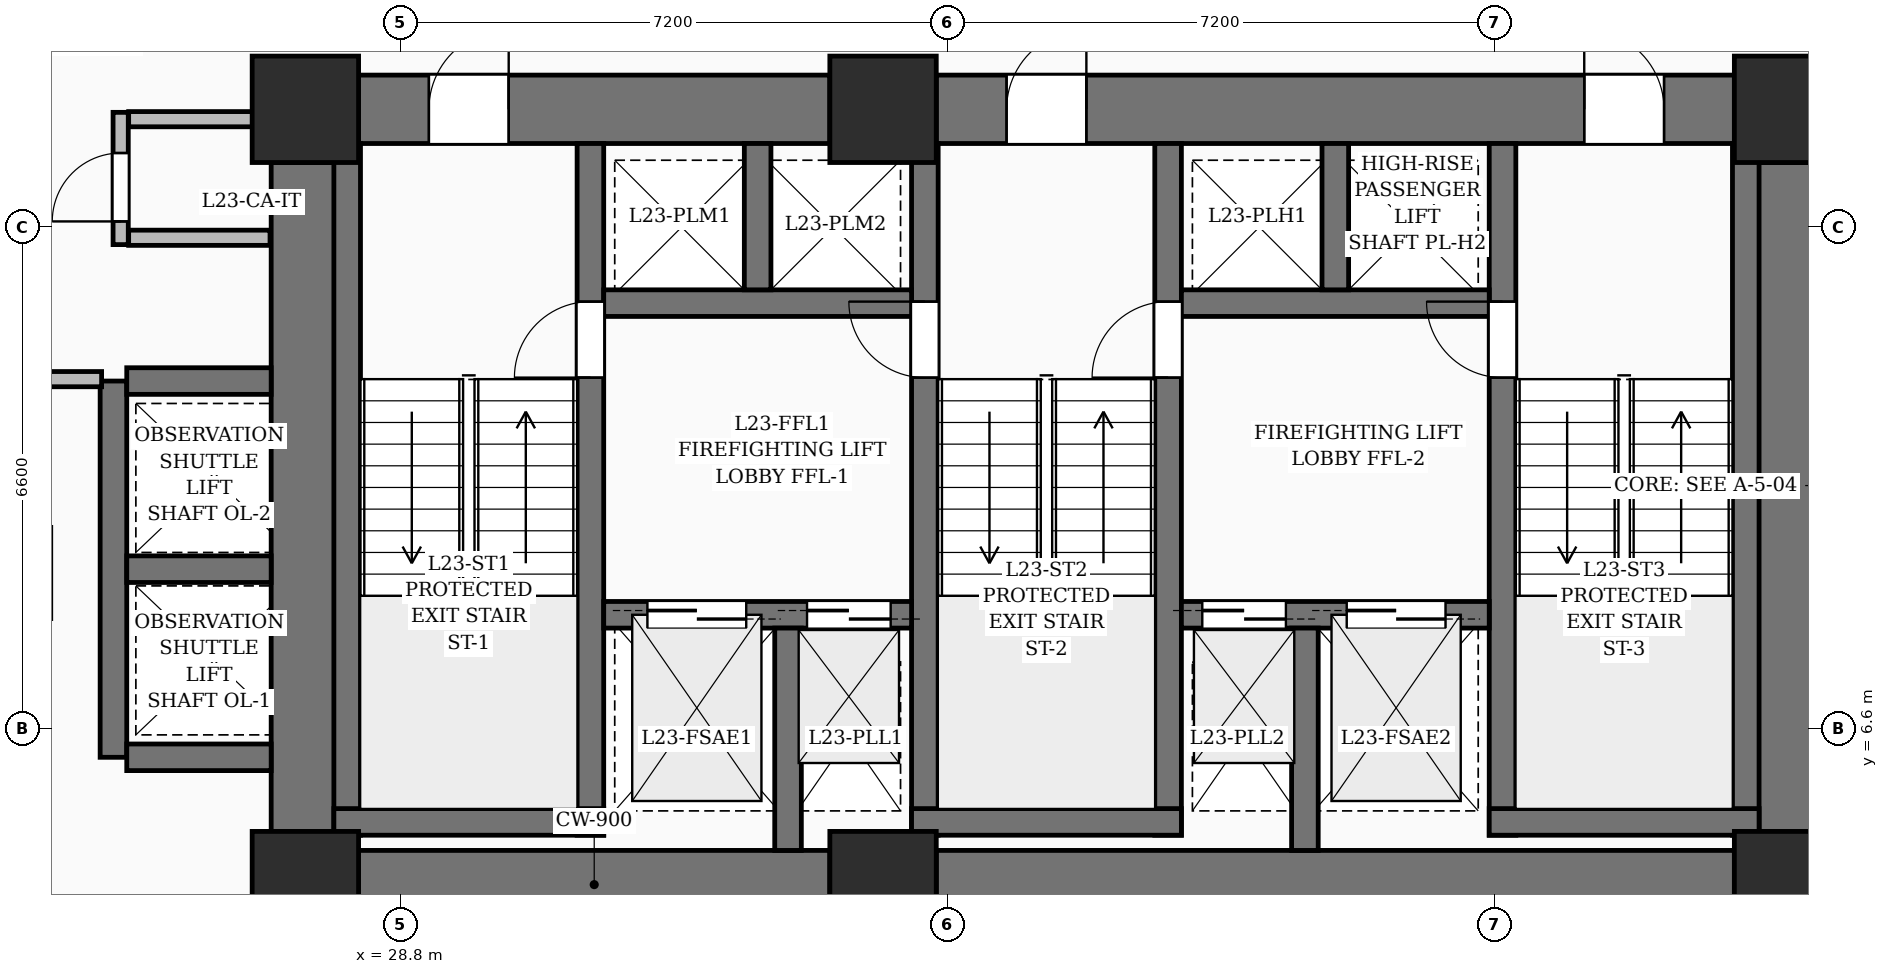
"""IFC4 building model, lengths in metres.
Left out: names, types, materials, properties, quantities, classifications, styles, units other than length and angle.
Written with IfcOpenShell. Run it as: python <this file> out.ifc"""

import sys

from ifc_helpers import new_model, si_unit, direction, frame, frame_2d, origin, origin_2d, place, context, subcontext, project, spatial, rectangle, extrude, element, fill, save


model = new_model("IFC4")
c1 = context("Model", 3, precision=1e-05, world=origin(), true_north=direction((0.0, 1.0)))
c2 = subcontext(c1, "Body", "Model", "MODEL_VIEW")
j1 = project(units=[si_unit("LENGTHUNIT", "METRE"), si_unit("PLANEANGLEUNIT", "RADIAN")], contexts=[c1])
p1 = place(None, origin())
s1 = spatial("IfcSite", under=j1, at=p1, CompositionType="ELEMENT")
p2 = place(p1, origin())
s2 = spatial("IfcBuilding", under=s1, at=p2, CompositionType="ELEMENT")
p3 = place(p2, frame((0.0, 0.0, 93.0)))
s3 = spatial("IfcBuildingStorey", under=s2, at=p3, CompositionType="ELEMENT", Elevation=93.0)
for number, where, z_axis, x_axis in (
    (1, (27.55, 4.55, 0.0), (0.0, 0.0, 1.0), (1.0, 0.0, 0.0)),
    (2, (35.15, 4.55, 0.0), (0.0, 0.0, 1.0), (1.0, 0.0, 0.0)),
    (3, (47.05, 4.55, 0.0), (0.0, 0.0, 1.0), (1.0, 0.0, 0.0)),
    (4, (27.55, 14.75, 0.0), (0.0, 0.0, 1.0), (1.0, 0.0, 0.0)),
    (5, (35.15, 14.75, 0.0), (0.0, 0.0, 1.0), (1.0, 0.0, 0.0)),
    (6, (47.05, 14.75, 0.0), (0.0, 0.0, 1.0), (1.0, 0.0, 0.0)),
):
    element("IfcColumn", number, at=place(p3, frame(where, z_axis=z_axis, x_axis=x_axis)), inside=s3, PredefinedType="COLUMN", context=c2, shape_type="SweptSolid", body=[
        extrude(rectangle(XDim=1.4, YDim=1.4, at=origin_2d()), origin(), (0.0, 0.0, 1.0), 3.6),
    ])
p4 = place(p3, frame((28.25, 4.55, 0.0), z_axis=(0.0, 0.0, 1.0), x_axis=(1.0, 0.0, 0.0)))
e7 = element("IfcWall", 7, at=p4, inside=s3, PredefinedType="SHEAR", context=c2, shape_type="SweptSolid", body=[
    extrude(rectangle(XDim=6.2, YDim=0.9, at=frame_2d((3.1, 0.0))), origin(), (0.0, 0.0, 1.0), 3.6),
])
p5 = place(p3, frame((35.85, 4.55, 0.0), z_axis=(0.0, 0.0, 1.0), x_axis=(1.0, 0.0, 0.0)))
e8 = element("IfcWall", 8, at=p5, inside=s3, PredefinedType="SHEAR", context=c2, shape_type="SweptSolid", body=[
    extrude(rectangle(XDim=10.5, YDim=0.9, at=frame_2d((5.25, 0.0))), origin(), (0.0, 0.0, 1.0), 3.6),
])
p6 = place(p3, frame((28.25, 14.75, 0.0), z_axis=(0.0, 0.0, 1.0), x_axis=(1.0, 0.0, 0.0)))
e9 = element("IfcWall", 9, at=p6, inside=s3, PredefinedType="SHEAR", context=c2, shape_type="SweptSolid", body=[
    extrude(rectangle(XDim=6.2, YDim=0.9, at=frame_2d((3.1, 0.0))), origin(), (0.0, 0.0, 1.0), 3.6),
])
p7 = place(p6, frame((0.925, 0.0, 0.0)))
e10 = element("IfcOpeningElement", 10, at=p7, cuts=e9, PredefinedType="OPENING", context=c2, shape_type="SweptSolid", body=[
    extrude(rectangle(XDim=1.05, YDim=2.15, at=frame_2d((0.525, 1.075))), frame((0.0, 0.46, 0.0), z_axis=(0.0, -1.0, 0.0), x_axis=(1.0, 0.0, 0.0)), (0.0, 0.0, 1.0), 0.92),
])
p8 = place(p3, frame((35.85, 14.75, 0.0), z_axis=(0.0, 0.0, 1.0), x_axis=(1.0, 0.0, 0.0)))
e11 = element("IfcWall", 11, at=p8, inside=s3, PredefinedType="SHEAR", context=c2, shape_type="SweptSolid", body=[
    extrude(rectangle(XDim=10.5, YDim=0.9, at=frame_2d((5.25, 0.0))), origin(), (0.0, 0.0, 1.0), 3.6),
])
p9 = place(p8, frame((0.925, 0.0, 0.0)))
e12 = element("IfcOpeningElement", 12, at=p9, cuts=e11, PredefinedType="OPENING", context=c2, shape_type="SweptSolid", body=[
    extrude(rectangle(XDim=1.05, YDim=2.15, at=frame_2d((0.525, 1.075))), frame((0.0, 0.46, 0.0), z_axis=(0.0, -1.0, 0.0), x_axis=(1.0, 0.0, 0.0)), (0.0, 0.0, 1.0), 0.92),
])
p10 = place(p8, frame((8.525, 0.0, 0.0)))
e13 = element("IfcOpeningElement", 13, at=p10, cuts=e11, PredefinedType="OPENING", context=c2, shape_type="SweptSolid", body=[
    extrude(rectangle(XDim=1.05, YDim=2.15, at=frame_2d((0.525, 1.075))), frame((0.0, 0.46, 0.0), z_axis=(0.0, -1.0, 0.0), x_axis=(1.0, 0.0, 0.0)), (0.0, 0.0, 1.0), 0.92),
])
for number, where, z_axis, x_axis in (
    (14, (27.55, 5.25, 0.0), (0.0, 0.0, 1.0), (0.0, 1.0, 0.0)),
    (15, (47.05, 5.25, 0.0), (0.0, 0.0, 1.0), (0.0, 1.0, 0.0)),
):
    element("IfcWall", number, at=place(p3, frame(where, z_axis=z_axis, x_axis=x_axis)), inside=s3, PredefinedType="SHEAR", context=c2, shape_type="SweptSolid", body=[
        extrude(rectangle(XDim=8.8, YDim=0.9, at=frame_2d((4.4, 0.0))), origin(), (0.0, 0.0, 1.0), 3.6),
    ])
p11 = place(p3, frame((28.1, 5.2, 0.0), z_axis=(0.0, 0.0, 1.0), x_axis=(0.0, 1.0, 0.0)))
e16 = element("IfcWall", 16, at=p11, inside=s3, PredefinedType="SOLIDWALL", context=c2, shape_type="SweptSolid", body=[
    extrude(rectangle(XDim=9.1, YDim=0.35, at=frame_2d((4.55, 0.0))), origin(), (0.0, 0.0, 1.0), 3.6),
])
p12 = place(p3, frame((31.3, 5.2, 0.0), z_axis=(0.0, 0.0, 1.0), x_axis=(0.0, 1.0, 0.0)))
e17 = element("IfcWall", 17, at=p12, inside=s3, PredefinedType="SOLIDWALL", context=c2, shape_type="SweptSolid", body=[
    extrude(rectangle(XDim=9.1, YDim=0.35, at=frame_2d((4.55, 0.0))), origin(), (0.0, 0.0, 1.0), 3.6),
])
p13 = place(p12, frame((6.02, 0.0, 0.0)))
e18 = element("IfcOpeningElement", 18, at=p13, cuts=e17, PredefinedType="OPENING", context=c2, shape_type="SweptSolid", body=[
    extrude(rectangle(XDim=1.0, YDim=2.15, at=frame_2d((0.5, 1.075))), frame((0.0, 0.185, 0.0), z_axis=(0.0, -1.0, 0.0), x_axis=(1.0, 0.0, 0.0)), (0.0, 0.0, 1.0), 0.37),
])
p14 = place(p3, frame((27.925, 5.375, 0.0), z_axis=(0.0, 0.0, 1.0), x_axis=(1.0, 0.0, 0.0)))
e19 = element("IfcWall", 19, at=p14, inside=s3, PredefinedType="SOLIDWALL", context=c2, shape_type="SweptSolid", body=[
    extrude(rectangle(XDim=3.55, YDim=0.35, at=frame_2d((1.775, 0.0))), origin(), (0.0, 0.0, 1.0), 3.6),
])
p15 = place(p3, frame((35.7, 5.2, 0.0), z_axis=(0.0, 0.0, 1.0), x_axis=(0.0, 1.0, 0.0)))
e20 = element("IfcWall", 20, at=p15, inside=s3, PredefinedType="SOLIDWALL", context=c2, shape_type="SweptSolid", body=[
    extrude(rectangle(XDim=9.1, YDim=0.35, at=frame_2d((4.55, 0.0))), origin(), (0.0, 0.0, 1.0), 3.6),
])
p16 = place(p15, frame((6.02, 0.0, 0.0)))
e21 = element("IfcOpeningElement", 21, at=p16, cuts=e20, PredefinedType="OPENING", context=c2, shape_type="SweptSolid", body=[
    extrude(rectangle(XDim=1.0, YDim=2.15, at=frame_2d((0.5, 1.075))), frame((0.0, 0.185, 0.0), z_axis=(0.0, -1.0, 0.0), x_axis=(1.0, 0.0, 0.0)), (0.0, 0.0, 1.0), 0.37),
])
p17 = place(p3, frame((38.9, 5.2, 0.0), z_axis=(0.0, 0.0, 1.0), x_axis=(0.0, 1.0, 0.0)))
e22 = element("IfcWall", 22, at=p17, inside=s3, PredefinedType="SOLIDWALL", context=c2, shape_type="SweptSolid", body=[
    extrude(rectangle(XDim=9.1, YDim=0.35, at=frame_2d((4.55, 0.0))), origin(), (0.0, 0.0, 1.0), 3.6),
])
p18 = place(p17, frame((6.02, 0.0, 0.0)))
e23 = element("IfcOpeningElement", 23, at=p18, cuts=e22, PredefinedType="OPENING", context=c2, shape_type="SweptSolid", body=[
    extrude(rectangle(XDim=1.0, YDim=2.15, at=frame_2d((0.5, 1.075))), frame((0.0, 0.185, 0.0), z_axis=(0.0, -1.0, 0.0), x_axis=(1.0, 0.0, 0.0)), (0.0, 0.0, 1.0), 0.37),
])
p19 = place(p3, frame((35.525, 5.375, 0.0), z_axis=(0.0, 0.0, 1.0), x_axis=(1.0, 0.0, 0.0)))
e24 = element("IfcWall", 24, at=p19, inside=s3, PredefinedType="SOLIDWALL", context=c2, shape_type="SweptSolid", body=[
    extrude(rectangle(XDim=3.55, YDim=0.35, at=frame_2d((1.775, 0.0))), origin(), (0.0, 0.0, 1.0), 3.6),
])
p20 = place(p3, frame((43.3, 5.2, 0.0), z_axis=(0.0, 0.0, 1.0), x_axis=(0.0, 1.0, 0.0)))
e25 = element("IfcWall", 25, at=p20, inside=s3, PredefinedType="SOLIDWALL", context=c2, shape_type="SweptSolid", body=[
    extrude(rectangle(XDim=9.1, YDim=0.35, at=frame_2d((4.55, 0.0))), origin(), (0.0, 0.0, 1.0), 3.6),
])
p21 = place(p20, frame((6.02, 0.0, 0.0)))
e26 = element("IfcOpeningElement", 26, at=p21, cuts=e25, PredefinedType="OPENING", context=c2, shape_type="SweptSolid", body=[
    extrude(rectangle(XDim=1.0, YDim=2.15, at=frame_2d((0.5, 1.075))), frame((0.0, 0.185, 0.0), z_axis=(0.0, -1.0, 0.0), x_axis=(1.0, 0.0, 0.0)), (0.0, 0.0, 1.0), 0.37),
])
p22 = place(p3, frame((46.5, 5.2, 0.0), z_axis=(0.0, 0.0, 1.0), x_axis=(0.0, 1.0, 0.0)))
e27 = element("IfcWall", 27, at=p22, inside=s3, PredefinedType="SOLIDWALL", context=c2, shape_type="SweptSolid", body=[
    extrude(rectangle(XDim=9.1, YDim=0.35, at=frame_2d((4.55, 0.0))), origin(), (0.0, 0.0, 1.0), 3.6),
])
p23 = place(p3, frame((43.125, 5.375, 0.0), z_axis=(0.0, 0.0, 1.0), x_axis=(1.0, 0.0, 0.0)))
e28 = element("IfcWall", 28, at=p23, inside=s3, PredefinedType="SOLIDWALL", context=c2, shape_type="SweptSolid", body=[
    extrude(rectangle(XDim=3.55, YDim=0.35, at=frame_2d((1.775, 0.0))), origin(), (0.0, 0.0, 1.0), 3.6),
])
p24 = place(p3, frame((31.475, 8.1, 0.0), z_axis=(0.0, 0.0, 1.0), x_axis=(1.0, 0.0, 0.0)))
e29 = element("IfcWall", 29, at=p24, inside=s3, PredefinedType="SOLIDWALL", context=c2, shape_type="SweptSolid", body=[
    extrude(rectangle(XDim=4.05, YDim=0.35, at=frame_2d((2.025, 0.0))), origin(), (0.0, 0.0, 1.0), 3.6),
])
p25 = place(p24, frame((0.575, 0.0, 0.0)))
e30 = element("IfcOpeningElement", 30, at=p25, cuts=e29, PredefinedType="OPENING", context=c2, shape_type="SweptSolid", body=[
    extrude(rectangle(XDim=1.3, YDim=2.25, at=frame_2d((0.65, 1.125))), frame((0.0, 0.185, 0.0), z_axis=(0.0, -1.0, 0.0), x_axis=(1.0, 0.0, 0.0)), (0.0, 0.0, 1.0), 0.37),
])
p26 = place(p24, frame((2.675, 0.0, 0.0)))
e31 = element("IfcOpeningElement", 31, at=p26, cuts=e29, PredefinedType="OPENING", context=c2, shape_type="SweptSolid", body=[
    extrude(rectangle(XDim=1.1, YDim=2.2, at=frame_2d((0.55, 1.1))), frame((0.0, 0.185, 0.0), z_axis=(0.0, -1.0, 0.0), x_axis=(1.0, 0.0, 0.0)), (0.0, 0.0, 1.0), 0.37),
])
p27 = place(p3, frame((39.075, 8.1, 0.0), z_axis=(0.0, 0.0, 1.0), x_axis=(1.0, 0.0, 0.0)))
e32 = element("IfcWall", 32, at=p27, inside=s3, PredefinedType="SOLIDWALL", context=c2, shape_type="SweptSolid", body=[
    extrude(rectangle(XDim=4.05, YDim=0.35, at=frame_2d((2.025, 0.0))), origin(), (0.0, 0.0, 1.0), 3.6),
])
p28 = place(p27, frame((2.175, 0.0, 0.0)))
e33 = element("IfcOpeningElement", 33, at=p28, cuts=e32, PredefinedType="OPENING", context=c2, shape_type="SweptSolid", body=[
    extrude(rectangle(XDim=1.3, YDim=2.25, at=frame_2d((0.65, 1.125))), frame((0.0, 0.185, 0.0), z_axis=(0.0, -1.0, 0.0), x_axis=(1.0, 0.0, 0.0)), (0.0, 0.0, 1.0), 0.37),
])
p29 = place(p27, frame((0.275, 0.0, 0.0)))
e34 = element("IfcOpeningElement", 34, at=p29, cuts=e32, PredefinedType="OPENING", context=c2, shape_type="SweptSolid", body=[
    extrude(rectangle(XDim=1.1, YDim=2.2, at=frame_2d((0.55, 1.1))), frame((0.0, 0.185, 0.0), z_axis=(0.0, -1.0, 0.0), x_axis=(1.0, 0.0, 0.0)), (0.0, 0.0, 1.0), 0.37),
])
for number, where, z_axis, x_axis in (
    (35, (33.9, 5.0, 0.0), (0.0, 0.0, 1.0), (0.0, 1.0, 0.0)),
    (36, (40.7, 5.0, 0.0), (0.0, 0.0, 1.0), (0.0, 1.0, 0.0)),
):
    element("IfcWall", number, at=place(p3, frame(where, z_axis=z_axis, x_axis=x_axis)), inside=s3, PredefinedType="SOLIDWALL", context=c2, shape_type="SweptSolid", body=[
        extrude(rectangle(XDim=2.925, YDim=0.35, at=frame_2d((1.462, 0.0))), origin(), (0.0, 0.0, 1.0), 3.6),
    ])
p30 = place(p3, frame((31.475, 12.2, 0.0), z_axis=(0.0, 0.0, 1.0), x_axis=(1.0, 0.0, 0.0)))
e37 = element("IfcWall", 37, at=p30, inside=s3, PredefinedType="SOLIDWALL", context=c2, shape_type="SweptSolid", body=[
    extrude(rectangle(XDim=4.05, YDim=0.35, at=frame_2d((2.025, 0.0))), origin(), (0.0, 0.0, 1.0), 3.6),
])
p31 = place(p3, frame((33.5, 12.375, 0.0), z_axis=(0.0, 0.0, 1.0), x_axis=(0.0, 1.0, 0.0)))
e38 = element("IfcWall", 38, at=p31, inside=s3, PredefinedType="SOLIDWALL", context=c2, shape_type="SweptSolid", body=[
    extrude(rectangle(XDim=1.925, YDim=0.35, at=frame_2d((0.962, 0.0))), origin(), (0.0, 0.0, 1.0), 3.6),
])
p32 = place(p3, frame((39.075, 12.2, 0.0), z_axis=(0.0, 0.0, 1.0), x_axis=(1.0, 0.0, 0.0)))
e39 = element("IfcWall", 39, at=p32, inside=s3, PredefinedType="SOLIDWALL", context=c2, shape_type="SweptSolid", body=[
    extrude(rectangle(XDim=4.05, YDim=0.35, at=frame_2d((2.025, 0.0))), origin(), (0.0, 0.0, 1.0), 3.6),
])
p33 = place(p3, frame((41.1, 12.375, 0.0), z_axis=(0.0, 0.0, 1.0), x_axis=(0.0, 1.0, 0.0)))
e40 = element("IfcWall", 40, at=p33, inside=s3, PredefinedType="SOLIDWALL", context=c2, shape_type="SweptSolid", body=[
    extrude(rectangle(XDim=1.925, YDim=0.35, at=frame_2d((0.962, 0.0))), origin(), (0.0, 0.0, 1.0), 3.6),
])
p34 = place(p3, frame((25.025, 6.225, 0.0), z_axis=(0.0, 0.0, 1.0), x_axis=(0.0, 1.0, 0.0)))
e41 = element("IfcWall", 41, at=p34, inside=s3, PredefinedType="SOLIDWALL", context=c2, shape_type="SweptSolid", body=[
    extrude(rectangle(XDim=4.95, YDim=0.35, at=frame_2d((2.475, 0.0))), origin(), (0.0, 0.0, 1.0), 3.6),
])
for number, where, z_axis, x_axis in (
    (42, (25.2, 6.225, 0.0), (0.0, 0.0, 1.0), (1.0, 0.0, 0.0)),
    (43, (25.2, 8.7, 0.0), (0.0, 0.0, 1.0), (1.0, 0.0, 0.0)),
    (44, (25.2, 11.175, 0.0), (0.0, 0.0, 1.0), (1.0, 0.0, 0.0)),
):
    element("IfcWall", number, at=place(p3, frame(where, z_axis=z_axis, x_axis=x_axis)), inside=s3, PredefinedType="SOLIDWALL", context=c2, shape_type="SweptSolid", body=[
        extrude(rectangle(XDim=1.9, YDim=0.35, at=frame_2d((0.95, 0.0))), origin(), (0.0, 0.0, 1.0), 3.6),
    ])
p35 = place(p3, frame((25.12, 12.97, 0.0), z_axis=(0.0, 0.0, 1.0), x_axis=(0.0, 1.0, 0.0)))
e45 = element("IfcWall", 45, at=p35, inside=s3, PredefinedType="PARTITIONING", context=c2, shape_type="SweptSolid", body=[
    extrude(rectangle(XDim=1.74, YDim=0.2, at=frame_2d((0.87, 0.0))), origin(), (0.0, 0.0, 1.0), 3.35),
])
p36 = place(p35, frame((0.305, 0.0, 0.0)))
e46 = element("IfcOpeningElement", 46, at=p36, cuts=e45, PredefinedType="OPENING", context=c2, shape_type="SweptSolid", body=[
    extrude(rectangle(XDim=0.9, YDim=2.1, at=frame_2d((0.45, 1.05))), frame((0.0, 0.11, 0.0), z_axis=(0.0, -1.0, 0.0), x_axis=(1.0, 0.0, 0.0)), (0.0, 0.0, 1.0), 0.22),
])
for number, where, z_axis, x_axis in (
    (47, (25.225, 14.62, 0.0), (0.0, 0.0, 1.0), (1.0, 0.0, 0.0)),
    (48, (25.225, 13.06, 0.0), (0.0, 0.0, 1.0), (1.0, 0.0, 0.0)),
):
    element("IfcWall", number, at=place(p3, frame(where, z_axis=z_axis, x_axis=x_axis)), inside=s3, PredefinedType="PARTITIONING", context=c2, shape_type="SweptSolid", body=[
        extrude(rectangle(XDim=1.86, YDim=0.2, at=frame_2d((0.93, 0.0))), origin(), (0.0, 0.0, 1.0), 3.35),
    ])
p37 = place(p3, frame((21.485, 11.2, 0.0), z_axis=(0.0, 0.0, 1.0), x_axis=(1.0, 0.0, 0.0)))
e49 = element("IfcWall", 49, at=p37, inside=s3, PredefinedType="PARTITIONING", context=c2, shape_type="SweptSolid", body=[
    extrude(rectangle(XDim=3.384, YDim=0.2, at=frame_2d((1.692, 0.0))), origin(), (0.0, 0.0, 1.0), 3.35),
])
p38 = place(p37, frame((0.905, 0.0, 0.0)))
e50 = element("IfcOpeningElement", 50, at=p38, cuts=e49, PredefinedType="OPENING", context=c2, shape_type="SweptSolid", body=[
    extrude(rectangle(XDim=1.6, YDim=2.3, at=frame_2d((0.8, 1.15))), frame((0.0, 0.11, 0.0), z_axis=(0.0, -1.0, 0.0), x_axis=(1.0, 0.0, 0.0)), (0.0, 0.0, 1.0), 0.22),
])
p39 = place(p7, origin())
e51 = element("IfcDoor", 51, at=p39, inside=s3, OperationType="SINGLE_SWING_RIGHT", PredefinedType="DOOR", context=c2, shape_type="SweptSolid", body=[
    extrude(rectangle(XDim=1.05, YDim=2.15, at=frame_2d((0.525, 1.075))), frame((0.0, 0.025, 0.0), z_axis=(0.0, -1.0, 0.0), x_axis=(1.0, 0.0, 0.0)), (0.0, 0.0, 1.0), 0.05),
])
fill(e10, e51)
p40 = place(p9, origin())
e52 = element("IfcDoor", 52, at=p40, inside=s3, OperationType="SINGLE_SWING_RIGHT", PredefinedType="DOOR", context=c2, shape_type="SweptSolid", body=[
    extrude(rectangle(XDim=1.05, YDim=2.15, at=frame_2d((0.525, 1.075))), frame((0.0, 0.025, 0.0), z_axis=(0.0, -1.0, 0.0), x_axis=(1.0, 0.0, 0.0)), (0.0, 0.0, 1.0), 0.05),
])
fill(e12, e52)
p41 = place(p10, origin())
e53 = element("IfcDoor", 53, at=p41, inside=s3, OperationType="SINGLE_SWING_LEFT", PredefinedType="DOOR", context=c2, shape_type="SweptSolid", body=[
    extrude(rectangle(XDim=1.05, YDim=2.15, at=frame_2d((0.525, 1.075))), frame((0.0, 0.025, 0.0), z_axis=(0.0, -1.0, 0.0), x_axis=(1.0, 0.0, 0.0)), (0.0, 0.0, 1.0), 0.05),
])
fill(e13, e53)
p42 = place(p13, origin())
e54 = element("IfcDoor", 54, at=p42, inside=s3, OperationType="SINGLE_SWING_LEFT", PredefinedType="DOOR", context=c2, shape_type="SweptSolid", body=[
    extrude(rectangle(XDim=1.0, YDim=2.15, at=frame_2d((0.5, 1.075))), frame((0.0, 0.025, 0.0), z_axis=(0.0, -1.0, 0.0), x_axis=(1.0, 0.0, 0.0)), (0.0, 0.0, 1.0), 0.05),
])
fill(e18, e54)
p43 = place(p16, origin())
e55 = element("IfcDoor", 55, at=p43, inside=s3, OperationType="SINGLE_SWING_RIGHT", PredefinedType="DOOR", context=c2, shape_type="SweptSolid", body=[
    extrude(rectangle(XDim=1.0, YDim=2.15, at=frame_2d((0.5, 1.075))), frame((0.0, 0.025, 0.0), z_axis=(0.0, -1.0, 0.0), x_axis=(1.0, 0.0, 0.0)), (0.0, 0.0, 1.0), 0.05),
])
fill(e21, e55)
p44 = place(p18, origin())
e56 = element("IfcDoor", 56, at=p44, inside=s3, OperationType="SINGLE_SWING_LEFT", PredefinedType="DOOR", context=c2, shape_type="SweptSolid", body=[
    extrude(rectangle(XDim=1.0, YDim=2.15, at=frame_2d((0.5, 1.075))), frame((0.0, 0.025, 0.0), z_axis=(0.0, -1.0, 0.0), x_axis=(1.0, 0.0, 0.0)), (0.0, 0.0, 1.0), 0.05),
])
fill(e23, e56)
p45 = place(p21, origin())
e57 = element("IfcDoor", 57, at=p45, inside=s3, OperationType="SINGLE_SWING_RIGHT", PredefinedType="DOOR", context=c2, shape_type="SweptSolid", body=[
    extrude(rectangle(XDim=1.0, YDim=2.15, at=frame_2d((0.5, 1.075))), frame((0.0, 0.025, 0.0), z_axis=(0.0, -1.0, 0.0), x_axis=(1.0, 0.0, 0.0)), (0.0, 0.0, 1.0), 0.05),
])
fill(e26, e57)
p46 = place(p25, origin())
e58 = element("IfcDoor", 58, at=p46, inside=s3, OperationType="DOUBLE_DOOR_SLIDING", PredefinedType="DOOR", context=c2, shape_type="SweptSolid", body=[
    extrude(rectangle(XDim=1.3, YDim=2.25, at=frame_2d((0.65, 1.125))), frame((0.0, 0.025, 0.0), z_axis=(0.0, -1.0, 0.0), x_axis=(1.0, 0.0, 0.0)), (0.0, 0.0, 1.0), 0.05),
])
fill(e30, e58)
p47 = place(p28, origin())
e59 = element("IfcDoor", 59, at=p47, inside=s3, OperationType="DOUBLE_DOOR_SLIDING", PredefinedType="DOOR", context=c2, shape_type="SweptSolid", body=[
    extrude(rectangle(XDim=1.3, YDim=2.25, at=frame_2d((0.65, 1.125))), frame((0.0, 0.025, 0.0), z_axis=(0.0, -1.0, 0.0), x_axis=(1.0, 0.0, 0.0)), (0.0, 0.0, 1.0), 0.05),
])
fill(e33, e59)
p48 = place(p26, origin())
e60 = element("IfcDoor", 60, at=p48, inside=s3, OperationType="DOUBLE_DOOR_SLIDING", PredefinedType="DOOR", context=c2, shape_type="SweptSolid", body=[
    extrude(rectangle(XDim=1.1, YDim=2.2, at=frame_2d((0.55, 1.1))), frame((0.0, 0.025, 0.0), z_axis=(0.0, -1.0, 0.0), x_axis=(1.0, 0.0, 0.0)), (0.0, 0.0, 1.0), 0.05),
])
fill(e31, e60)
p49 = place(p29, origin())
e61 = element("IfcDoor", 61, at=p49, inside=s3, OperationType="DOUBLE_DOOR_SLIDING", PredefinedType="DOOR", context=c2, shape_type="SweptSolid", body=[
    extrude(rectangle(XDim=1.1, YDim=2.2, at=frame_2d((0.55, 1.1))), frame((0.0, 0.025, 0.0), z_axis=(0.0, -1.0, 0.0), x_axis=(1.0, 0.0, 0.0)), (0.0, 0.0, 1.0), 0.05),
])
fill(e34, e61)
p50 = place(p36, origin())
e62 = element("IfcDoor", 62, at=p50, inside=s3, OperationType="SINGLE_SWING_LEFT", PredefinedType="DOOR", context=c2, shape_type="SweptSolid", body=[
    extrude(rectangle(XDim=0.9, YDim=2.1, at=frame_2d((0.45, 1.05))), frame((0.0, 0.025, 0.0), z_axis=(0.0, -1.0, 0.0), x_axis=(1.0, 0.0, 0.0)), (0.0, 0.0, 1.0), 0.05),
])
fill(e46, e62)
save(model, sys.argv[1])
